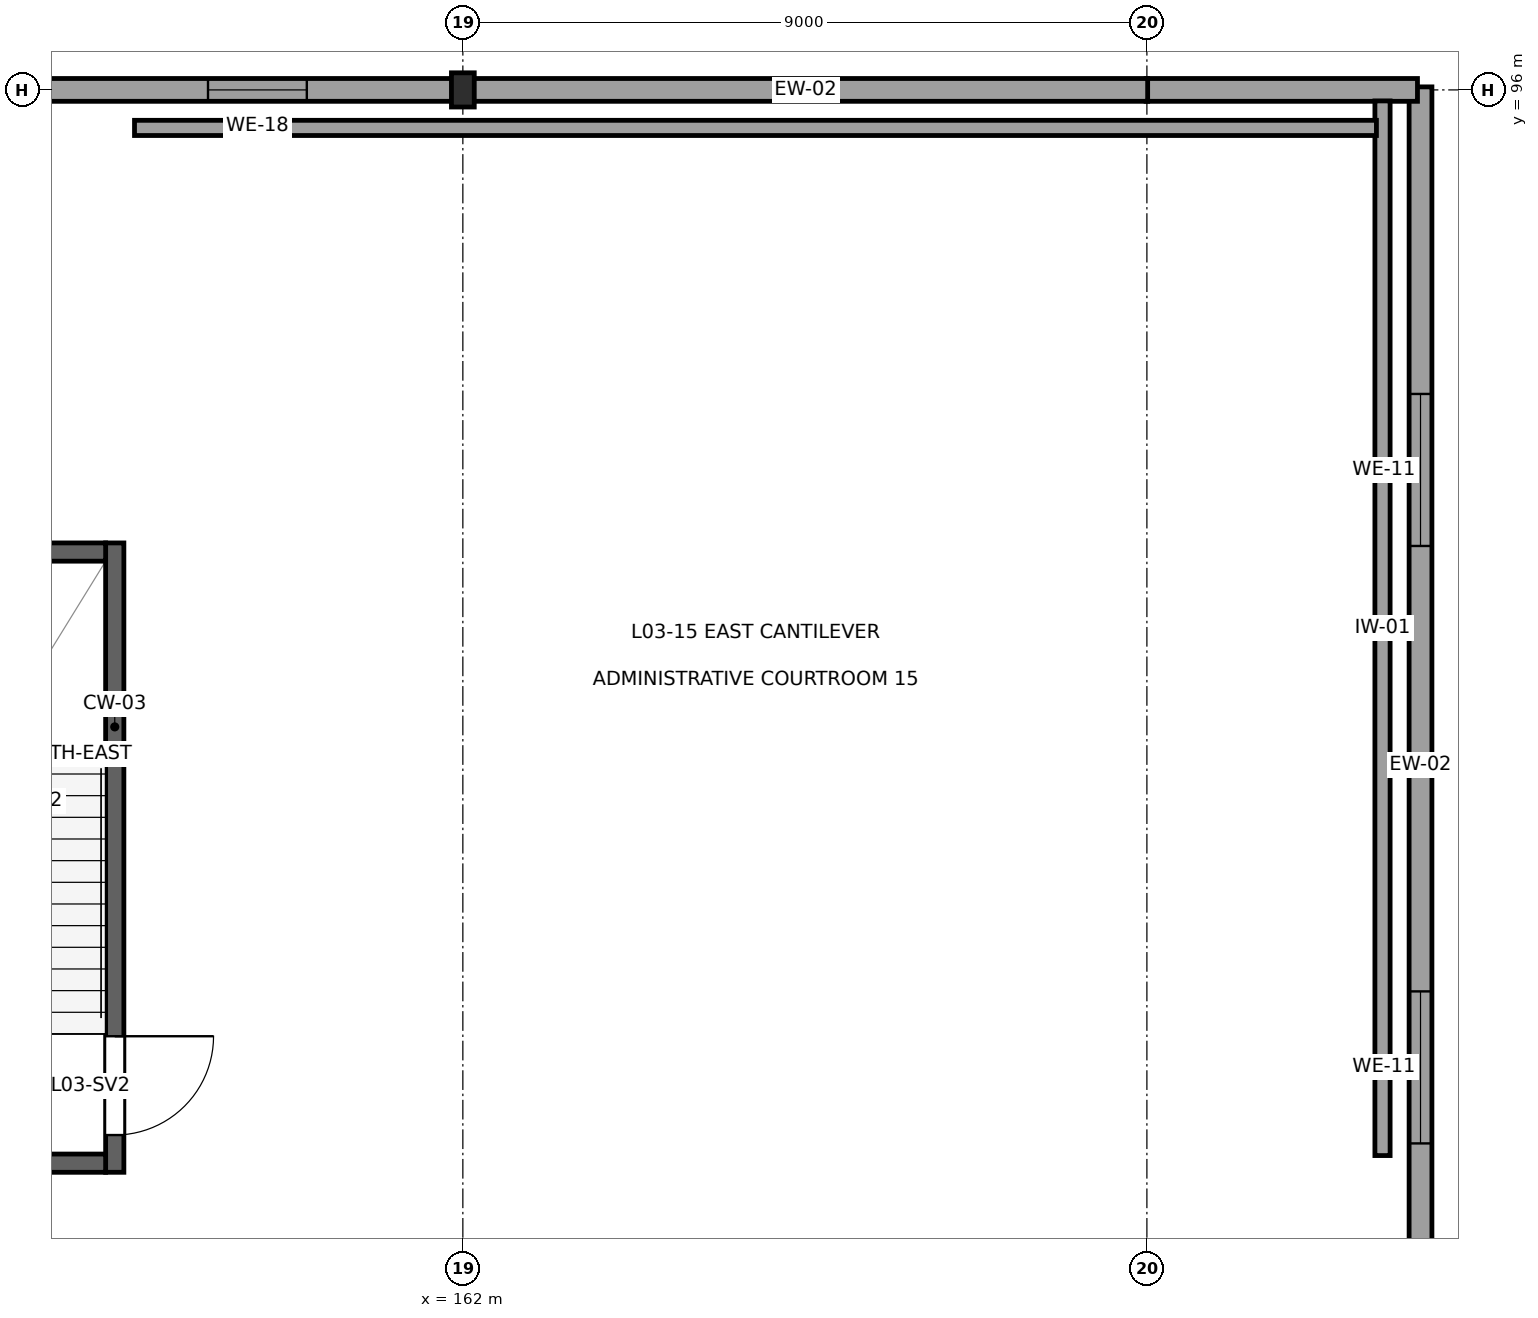
"""IFC4 building model, lengths in metres.
Left out: names, types, materials, properties, quantities, classifications, styles, units other than length and angle.
Written with IfcOpenShell. Run it as: python <this file> out.ifc"""

import sys

from ifc_helpers import new_model, si_unit, direction, frame, frame_2d, origin, origin_2d, place, context, subcontext, project, spatial, rectangle, i_section, extrude, element, fill, save


model = new_model("IFC4")
c1 = context("Model", 3, precision=1e-05, world=origin(), true_north=direction((0.0, 1.0)))
c2 = subcontext(c1, "Body", "Model", "MODEL_VIEW")
j1 = project(units=[si_unit("LENGTHUNIT", "METRE"), si_unit("PLANEANGLEUNIT", "RADIAN")], contexts=[c1])
p1 = place(None, origin())
s1 = spatial("IfcSite", under=j1, at=p1, CompositionType="ELEMENT")
p2 = place(p1, origin())
s2 = spatial("IfcBuilding", under=s1, at=p2, CompositionType="ELEMENT")
p3 = place(p2, frame((0.0, 0.0, 14.4)))
s3 = spatial("IfcBuildingStorey", under=s2, at=p3, CompositionType="ELEMENT", Elevation=14.4)
p4 = place(p3, frame((162.0, 96.0, 0.0), z_axis=(0.0, 0.0, 1.0), x_axis=(1.0, 0.0, 0.0)))
e1 = element("IfcColumn", 1, at=p4, inside=s3, PredefinedType="COLUMN", context=c2, shape_type="SweptSolid", body=[
    extrude(i_section(OverallWidth=0.3, OverallDepth=0.45, WebThickness=0.014, FlangeThickness=0.026, at=origin_2d()), origin(), (0.0, 0.0, 1.0), 4.5),
])
p5 = place(p3, frame((174.6, 78.04, 0.0), z_axis=(0.0, 0.0, 1.0), x_axis=(0.0, 1.0, 0.0)))
e2 = element("IfcWall", 2, at=p5, inside=s3, PredefinedType="SOLIDWALL", context=c2, shape_type="SweptSolid", body=[
    extrude(rectangle(XDim=18.0, YDim=0.3, at=frame_2d((9.0, 0.0))), origin(), (0.0, 0.0, 1.0), 3.545),
])
p6 = place(p5, frame((4.1, 0.0, 0.85)))
e3 = element("IfcOpeningElement", 3, at=p6, cuts=e2, PredefinedType="OPENING", context=c2, shape_type="SweptSolid", body=[
    extrude(rectangle(XDim=2.0, YDim=2.0, at=frame_2d((1.0, 1.0))), frame((0.0, 0.165, 0.0), z_axis=(0.0, -1.0, 0.0), x_axis=(1.0, 0.0, 0.0)), (0.0, 0.0, 1.0), 0.33),
])
p7 = place(p5, frame((11.96, 0.0, 0.85)))
e4 = element("IfcOpeningElement", 4, at=p7, cuts=e2, PredefinedType="OPENING", context=c2, shape_type="SweptSolid", body=[
    extrude(rectangle(XDim=2.0, YDim=2.0, at=frame_2d((1.0, 1.0))), frame((0.0, 0.165, 0.0), z_axis=(0.0, -1.0, 0.0), x_axis=(1.0, 0.0, 0.0)), (0.0, 0.0, 1.0), 0.33),
])
p8 = place(p3, frame((174.56, 96.0, 0.0), z_axis=(0.0, 0.0, 1.0), x_axis=(-1.0, 0.0, 0.0)))
e5 = element("IfcWall", 5, at=p8, inside=s3, PredefinedType="SOLIDWALL", context=c2, shape_type="SweptSolid", body=[
    extrude(rectangle(XDim=3.57, YDim=0.3, at=frame_2d((1.785, 0.0))), origin(), (0.0, 0.0, 1.0), 3.187),
])
p9 = place(p3, frame((171.01, 96.0, 0.0), z_axis=(0.0, 0.0, 1.0), x_axis=(-1.0, 0.0, 0.0)))
e6 = element("IfcWall", 6, at=p9, inside=s3, PredefinedType="SOLIDWALL", context=c2, shape_type="SweptSolid", body=[
    extrude(rectangle(XDim=9.002, YDim=0.3, at=frame_2d((4.501, 0.0))), origin(), (0.0, 0.0, 1.0), 3.187),
])
p10 = place(p3, frame((161.992, 96.0, 0.0), z_axis=(0.0, 0.0, 1.0), x_axis=(-1.0, 0.0, 0.0)))
e7 = element("IfcWall", 7, at=p10, inside=s3, PredefinedType="SOLIDWALL", context=c2, shape_type="SweptSolid", body=[
    extrude(rectangle(XDim=8.984, YDim=0.3, at=frame_2d((4.492, 0.0))), origin(), (0.0, 0.0, 1.0), 3.187),
])
p11 = place(p10, frame((2.045, 0.0, 0.9)))
e8 = element("IfcOpeningElement", 8, at=p11, cuts=e7, PredefinedType="OPENING", context=c2, shape_type="SweptSolid", body=[
    extrude(rectangle(XDim=1.3, YDim=1.3, at=frame_2d((0.65, 0.65))), frame((0.0, 0.165, 0.0), z_axis=(0.0, -1.0, 0.0), x_axis=(1.0, 0.0, 0.0)), (0.0, 0.0, 1.0), 0.33),
])
p12 = place(p10, frame((5.639, 0.0, 0.9)))
e9 = element("IfcOpeningElement", 9, at=p12, cuts=e7, PredefinedType="OPENING", context=c2, shape_type="SweptSolid", body=[
    extrude(rectangle(XDim=1.3, YDim=1.3, at=frame_2d((0.65, 0.65))), frame((0.0, 0.165, 0.0), z_axis=(0.0, -1.0, 0.0), x_axis=(1.0, 0.0, 0.0)), (0.0, 0.0, 1.0), 0.33),
])
p13 = place(p3, frame((157.42, 81.76, 0.0), z_axis=(0.0, 0.0, 1.0), x_axis=(0.0, 1.0, 0.0)))
e10 = element("IfcWall", 10, at=p13, inside=s3, PredefinedType="SHEAR", context=c2, shape_type="SweptSolid", body=[
    extrude(rectangle(XDim=8.28, YDim=0.24, at=frame_2d((4.14, 0.0))), origin(), (0.0, 0.0, 1.0), 4.31),
])
p14 = place(p13, frame((0.49, 0.0, 0.0)))
e11 = element("IfcOpeningElement", 11, at=p14, cuts=e10, PredefinedType="OPENING", context=c2, shape_type="SweptSolid", body=[
    extrude(rectangle(XDim=1.3, YDim=2.2, at=frame_2d((0.65, 1.1))), frame((0.0, 0.135, 0.0), z_axis=(0.0, -1.0, 0.0), x_axis=(1.0, 0.0, 0.0)), (0.0, 0.0, 1.0), 0.27),
])
for number, where, z_axis, x_axis in (
    (12, (153.6, 81.88, 0.0), (0.0, 0.0, 1.0), (1.0, 0.0, 0.0)),
    (13, (153.6, 89.92, 0.0), (0.0, 0.0, 1.0), (1.0, 0.0, 0.0)),
):
    element("IfcWall", number, at=place(p3, frame(where, z_axis=z_axis, x_axis=x_axis)), inside=s3, PredefinedType="SHEAR", context=c2, shape_type="SweptSolid", body=[
        extrude(rectangle(XDim=3.7, YDim=0.24, at=frame_2d((1.85, 0.0))), origin(), (0.0, 0.0, 1.0), 4.31),
    ])
p15 = place(p3, frame((174.1, 95.855, 0.0), z_axis=(0.0, 0.0, 1.0), x_axis=(0.0, -1.0, 0.0)))
e14 = element("IfcWall", 14, at=p15, inside=s3, PredefinedType="PARTITIONING", context=c2, shape_type="SweptSolid", body=[
    extrude(rectangle(XDim=13.875, YDim=0.2, at=frame_2d((6.938, 0.0))), origin(), (0.0, 0.0, 1.0), 4.14),
])
p16 = place(p3, frame((157.68, 95.5, 0.0), z_axis=(0.0, 0.0, 1.0), x_axis=(1.0, 0.0, 0.0)))
e15 = element("IfcWall", 15, at=p16, inside=s3, PredefinedType="PARTITIONING", context=c2, shape_type="SweptSolid", body=[
    extrude(rectangle(XDim=16.34, YDim=0.2, at=frame_2d((8.17, 0.0))), origin(), (0.0, 0.0, 1.0), 4.14),
])
p17 = place(p6, origin())
e16 = element("IfcWindow", 16, at=p17, inside=s3, PartitioningType="SINGLE_PANEL", PredefinedType="WINDOW", context=c2, shape_type="SweptSolid", body=[
    extrude(rectangle(XDim=2.0, YDim=2.0, at=frame_2d((1.0, 1.0))), frame((0.0, 0.03, 0.0), z_axis=(0.0, -1.0, 0.0), x_axis=(1.0, 0.0, 0.0)), (0.0, 0.0, 1.0), 0.06),
])
fill(e3, e16)
p18 = place(p7, origin())
e17 = element("IfcWindow", 17, at=p18, inside=s3, PartitioningType="SINGLE_PANEL", PredefinedType="WINDOW", context=c2, shape_type="SweptSolid", body=[
    extrude(rectangle(XDim=2.0, YDim=2.0, at=frame_2d((1.0, 1.0))), frame((0.0, 0.03, 0.0), z_axis=(0.0, -1.0, 0.0), x_axis=(1.0, 0.0, 0.0)), (0.0, 0.0, 1.0), 0.06),
])
fill(e4, e17)
p19 = place(p11, origin())
e18 = element("IfcWindow", 18, at=p19, inside=s3, PartitioningType="SINGLE_PANEL", PredefinedType="WINDOW", context=c2, shape_type="SweptSolid", body=[
    extrude(rectangle(XDim=1.3, YDim=1.3, at=frame_2d((0.65, 0.65))), frame((0.0, 0.03, 0.0), z_axis=(0.0, -1.0, 0.0), x_axis=(1.0, 0.0, 0.0)), (0.0, 0.0, 1.0), 0.06),
])
fill(e8, e18)
p20 = place(p14, frame((1.3, 0.0, 0.0), z_axis=(0.0, 0.0, 1.0), x_axis=(-1.0, 0.0, 0.0)))
e19 = element("IfcDoor", 19, at=p20, inside=s3, OperationType="SINGLE_SWING_RIGHT", PredefinedType="DOOR", context=c2, shape_type="SweptSolid", body=[
    extrude(rectangle(XDim=1.3, YDim=2.2, at=frame_2d((0.65, 1.1))), frame((0.0, 0.025, 0.0), z_axis=(0.0, -1.0, 0.0), x_axis=(1.0, 0.0, 0.0)), (0.0, 0.0, 1.0), 0.05),
])
fill(e11, e19)
save(model, sys.argv[1])
